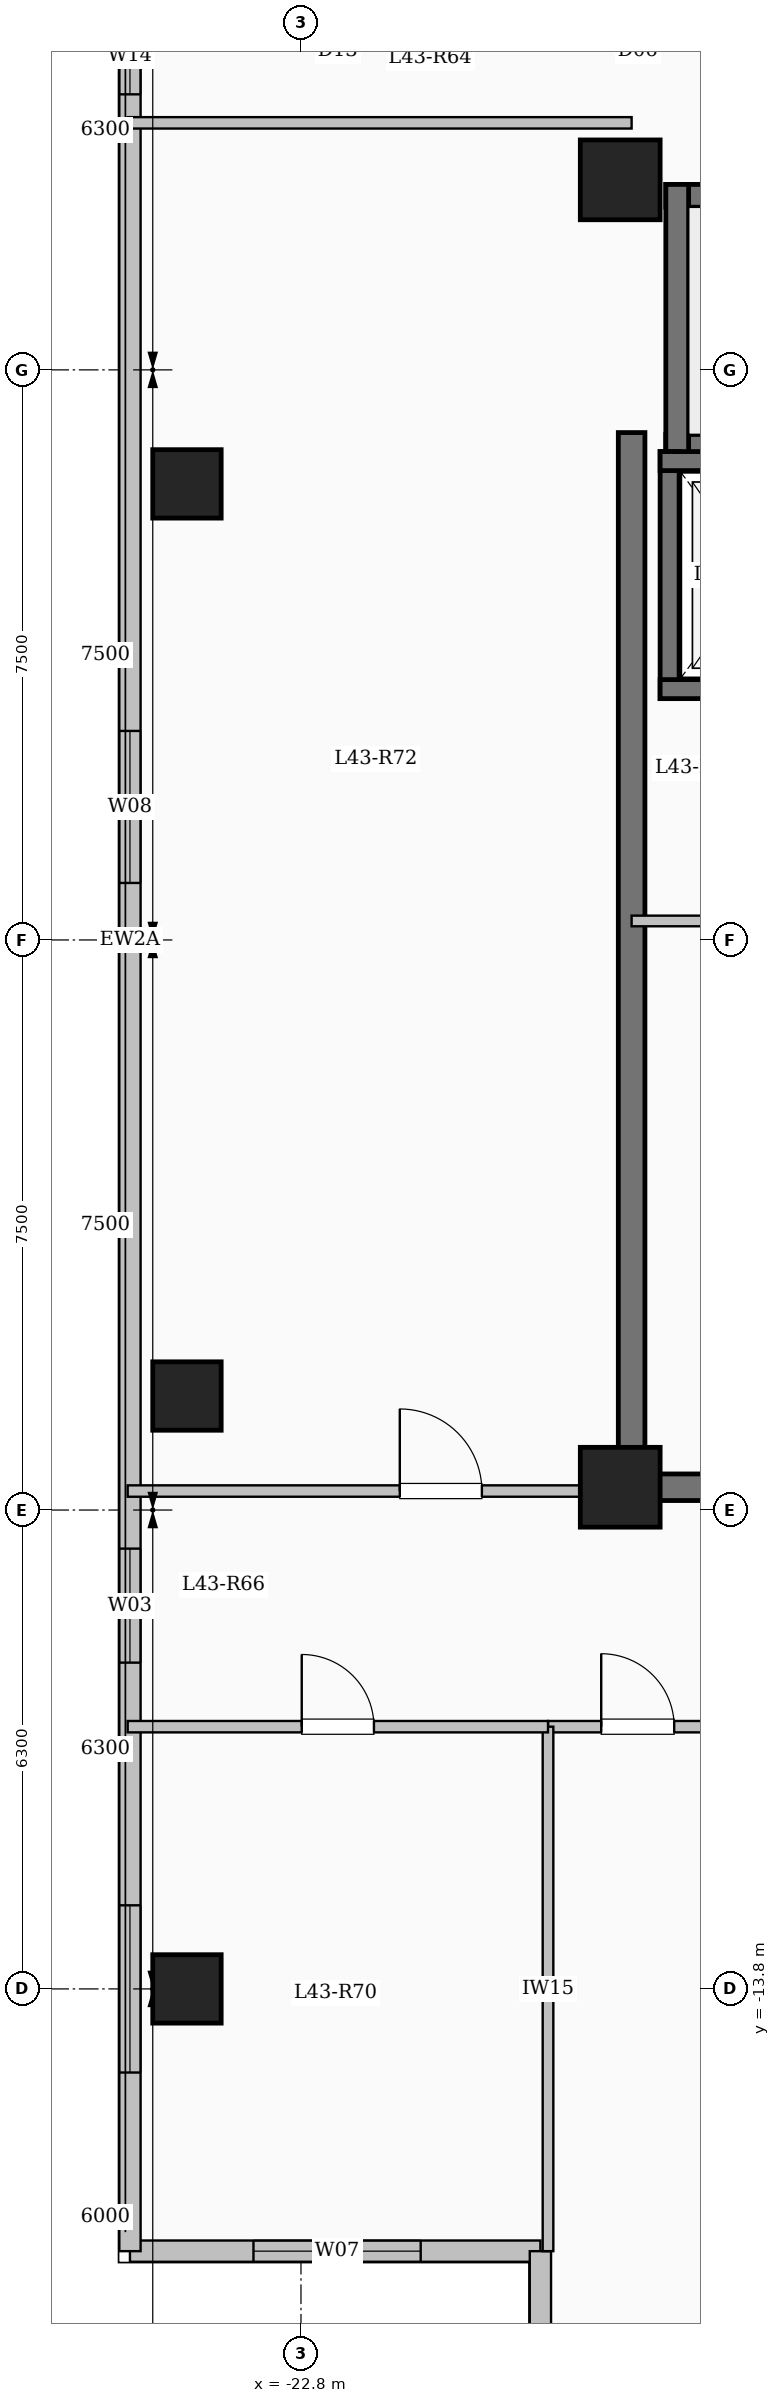
"""IFC4 building model, lengths in metres.
Left out: names, types, materials, properties, quantities, classifications, styles, units other than length and angle.
Written with IfcOpenShell. Run it as: python <this file> out.ifc"""

import sys

from ifc_helpers import new_model, si_unit, direction, frame, frame_2d, origin, origin_2d, place, context, subcontext, project, spatial, rectangle, extrude, element, fill, save


model = new_model("IFC4")
c1 = context("Model", 3, precision=1e-05, world=origin(), true_north=direction((0.0, 1.0)))
c2 = subcontext(c1, "Body", "Model", "MODEL_VIEW")
j1 = project(units=[si_unit("LENGTHUNIT", "METRE"), si_unit("PLANEANGLEUNIT", "RADIAN")], contexts=[c1])
p1 = place(None, origin())
s1 = spatial("IfcSite", under=j1, at=p1, CompositionType="ELEMENT")
p2 = place(p1, origin())
s2 = spatial("IfcBuilding", under=s1, at=p2, CompositionType="ELEMENT")
p3 = place(p2, frame((0.0, 0.0, 159.4)))
s3 = spatial("IfcBuildingStorey", under=s2, at=p3, CompositionType="ELEMENT", Elevation=159.4)
for number, where, z_axis, x_axis in (
    (1, (-18.6, -7.2, 0.0), (0.0, 0.0, 1.0), (1.0, 0.0, 0.0)),
    (2, (-18.6, 10.0, 0.0), (0.0, 0.0, 1.0), (1.0, 0.0, 0.0)),
):
    element("IfcColumn", number, at=place(p3, frame(where, z_axis=z_axis, x_axis=x_axis)), inside=s3, PredefinedType="COLUMN", context=c2, shape_type="SweptSolid", body=[
        extrude(rectangle(XDim=1.05, YDim=1.05, at=origin_2d()), origin(), (0.0, 0.0, 1.0), 3.35),
    ])
for number, where, z_axis, x_axis in (
    (3, (-24.3, -13.8, 0.0), (0.0, 0.0, 1.0), (1.0, 0.0, 0.0)),
    (4, (-24.3, -6.0, 0.0), (0.0, 0.0, 1.0), (1.0, 0.0, 0.0)),
    (5, (-24.3, 6.0, 0.0), (0.0, 0.0, 1.0), (1.0, 0.0, 0.0)),
):
    element("IfcColumn", number, at=place(p3, frame(where, z_axis=z_axis, x_axis=x_axis)), inside=s3, PredefinedType="COLUMN", context=c2, shape_type="SweptSolid", body=[
        extrude(rectangle(XDim=0.9, YDim=0.9, at=origin_2d()), origin(), (0.0, 0.0, 1.0), 3.35),
    ])
p4 = place(p3, frame((-19.65, -17.25, 0.0), z_axis=(0.0, 0.0, 1.0), x_axis=(-1.0, 0.0, 0.0)))
e6 = element("IfcWall", 6, at=p4, inside=s3, PredefinedType="SOLIDWALL", context=c2, shape_type="SweptSolid", body=[
    extrude(rectangle(XDim=5.4, YDim=0.28, at=frame_2d((2.7, 0.0))), origin(), (0.0, 0.0, 1.0), 3.1),
])
p5 = place(p4, frame((1.575, 0.0, 0.9)))
e7 = element("IfcOpeningElement", 7, at=p5, cuts=e6, PredefinedType="OPENING", context=c2, shape_type="SweptSolid", body=[
    extrude(rectangle(XDim=2.2, YDim=1.75, at=frame_2d((1.1, 0.875))), frame((0.0, 0.15, 0.0), z_axis=(0.0, -1.0, 0.0), x_axis=(1.0, 0.0, 0.0)), (0.0, 0.0, 1.0), 0.3),
])
p6 = place(p3, frame((-25.05, -17.25, 0.0), z_axis=(0.0, 0.0, 1.0), x_axis=(0.0, 1.0, 0.0)))
e8 = element("IfcWall", 8, at=p6, inside=s3, PredefinedType="SOLIDWALL", context=c2, shape_type="SweptSolid", body=[
    extrude(rectangle(XDim=34.5, YDim=0.28, at=frame_2d((17.25, 0.0))), origin(), (0.0, 0.0, 1.0), 3.1),
])
p7 = place(p6, frame((2.35, 0.0, 0.9)))
e9 = element("IfcOpeningElement", 9, at=p7, cuts=e8, PredefinedType="OPENING", context=c2, shape_type="SweptSolid", body=[
    extrude(rectangle(XDim=2.2, YDim=1.75, at=frame_2d((1.1, 0.875))), frame((0.0, 0.15, 0.0), z_axis=(0.0, -1.0, 0.0), x_axis=(1.0, 0.0, 0.0)), (0.0, 0.0, 1.0), 0.3),
])
p8 = place(p6, frame((7.742, 0.0, 0.9)))
e10 = element("IfcOpeningElement", 10, at=p8, cuts=e8, PredefinedType="OPENING", context=c2, shape_type="SweptSolid", body=[
    extrude(rectangle(XDim=1.5, YDim=1.65, at=frame_2d((0.75, 0.825))), frame((0.0, 0.15, 0.0), z_axis=(0.0, -1.0, 0.0), x_axis=(1.0, 0.0, 0.0)), (0.0, 0.0, 1.0), 0.3),
])
p9 = place(p6, frame((18.0, 0.0, 0.9)))
e11 = element("IfcOpeningElement", 11, at=p9, cuts=e8, PredefinedType="OPENING", context=c2, shape_type="SweptSolid", body=[
    extrude(rectangle(XDim=2.0, YDim=1.7, at=frame_2d((1.0, 0.85))), frame((0.0, 0.15, 0.0), z_axis=(0.0, -1.0, 0.0), x_axis=(1.0, 0.0, 0.0)), (0.0, 0.0, 1.0), 0.3),
])
p10 = place(p6, frame((28.375, 0.0, 0.95)))
e12 = element("IfcOpeningElement", 12, at=p10, cuts=e8, PredefinedType="OPENING", context=c2, shape_type="SweptSolid", body=[
    extrude(rectangle(XDim=1.0, YDim=1.5, at=frame_2d((0.5, 0.75))), frame((0.0, 0.15, 0.0), z_axis=(0.0, -1.0, 0.0), x_axis=(1.0, 0.0, 0.0)), (0.0, 0.0, 1.0), 0.3),
])
p11 = place(p6, frame((31.125, 0.0, 0.9)))
e13 = element("IfcOpeningElement", 13, at=p11, cuts=e8, PredefinedType="OPENING", context=c2, shape_type="SweptSolid", body=[
    extrude(rectangle(XDim=2.0, YDim=1.7, at=frame_2d((1.0, 0.85))), frame((0.0, 0.15, 0.0), z_axis=(0.0, -1.0, 0.0), x_axis=(1.0, 0.0, 0.0)), (0.0, 0.0, 1.0), 0.3),
])
p12 = place(p3, frame((-19.65, -21.15, 0.0), z_axis=(0.0, 0.0, 1.0), x_axis=(0.0, 1.0, 0.0)))
e14 = element("IfcWall", 14, at=p12, inside=s3, PredefinedType="SOLIDWALL", context=c2, shape_type="SweptSolid", body=[
    extrude(rectangle(XDim=3.9, YDim=0.28, at=frame_2d((1.95, 0.0))), origin(), (0.0, 0.0, 1.0), 3.1),
])
p13 = place(p12, frame((1.143, 0.0, 0.9)))
e15 = element("IfcOpeningElement", 15, at=p13, cuts=e14, PredefinedType="OPENING", context=c2, shape_type="SweptSolid", body=[
    extrude(rectangle(XDim=1.65, YDim=1.6, at=frame_2d((0.825, 0.8))), frame((0.0, 0.15, 0.0), z_axis=(0.0, -1.0, 0.0), x_axis=(1.0, 0.0, 0.0)), (0.0, 0.0, 1.0), 0.3),
])
p14 = place(p3, frame((-18.0, 9.79, 0.0), z_axis=(0.0, 0.0, 1.0), x_axis=(1.0, 0.0, 0.0)))
e16 = element("IfcWall", 16, at=p14, inside=s3, PredefinedType="SHEAR", context=c2, shape_type="SweptSolid", body=[
    extrude(rectangle(XDim=8.0, YDim=0.3, at=frame_2d((4.0, 0.0))), origin(), (0.0, 0.0, 1.0), 3.35),
])
p15 = place(p3, frame((-18.0, 6.5, 0.0), z_axis=(0.0, 0.0, 1.0), x_axis=(1.0, 0.0, 0.0)))
e17 = element("IfcWall", 17, at=p15, inside=s3, PredefinedType="SHEAR", context=c2, shape_type="SweptSolid", body=[
    extrude(rectangle(XDim=8.0, YDim=0.3, at=frame_2d((4.0, 0.0))), origin(), (0.0, 0.0, 1.0), 3.35),
])
p16 = place(p15, frame((6.45, 0.0, 0.0)))
e18 = element("IfcOpeningElement", 18, at=p16, cuts=e17, PredefinedType="OPENING", context=c2, shape_type="SweptSolid", body=[
    extrude(rectangle(XDim=1.0, YDim=2.15, at=frame_2d((0.5, 1.075))), frame((0.0, 0.16, 0.0), z_axis=(0.0, -1.0, 0.0), x_axis=(1.0, 0.0, 0.0)), (0.0, 0.0, 1.0), 0.32),
])
p17 = place(p3, frame((-17.85, 6.35, 0.0), z_axis=(0.0, 0.0, 1.0), x_axis=(0.0, 1.0, 0.0)))
e19 = element("IfcWall", 19, at=p17, inside=s3, PredefinedType="SHEAR", context=c2, shape_type="SweptSolid", body=[
    extrude(rectangle(XDim=3.59, YDim=0.3, at=frame_2d((1.795, 0.0))), origin(), (0.0, 0.0, 1.0), 3.35),
])
p18 = place(p3, frame((-17.95, 3.175, 0.0), z_axis=(0.0, 0.0, 1.0), x_axis=(0.0, 1.0, 0.0)))
e20 = element("IfcWall", 20, at=p18, inside=s3, PredefinedType="SHEAR", context=c2, shape_type="SweptSolid", body=[
    extrude(rectangle(XDim=3.25, YDim=0.25, at=frame_2d((1.625, 0.0))), origin(), (0.0, 0.0, 1.0), 3.35),
])
for number, where, z_axis, x_axis in (
    (21, (-18.075, 3.3, 0.0), (0.0, 0.0, 1.0), (1.0, 0.0, 0.0)),
    (22, (-18.075, 6.3, 0.0), (0.0, 0.0, 1.0), (1.0, 0.0, 0.0)),
):
    element("IfcWall", number, at=place(p3, frame(where, z_axis=z_axis, x_axis=x_axis)), inside=s3, PredefinedType="SHEAR", context=c2, shape_type="SweptSolid", body=[
        extrude(rectangle(XDim=2.55, YDim=0.25, at=frame_2d((1.275, 0.0))), origin(), (0.0, 0.0, 1.0), 3.35),
    ])
p19 = place(p3, frame((-18.45, -7.375, 0.0), z_axis=(0.0, 0.0, 1.0), x_axis=(0.0, 1.0, 0.0)))
e23 = element("IfcWall", 23, at=p19, inside=s3, PredefinedType="SHEAR", context=c2, shape_type="SweptSolid", body=[
    extrude(rectangle(XDim=14.05, YDim=0.35, at=frame_2d((7.025, 0.0))), origin(), (0.0, 0.0, 1.0), 3.35),
])
p20 = place(p3, frame((-18.625, -7.2, 0.0), z_axis=(0.0, 0.0, 1.0), x_axis=(1.0, 0.0, 0.0)))
e24 = element("IfcWall", 24, at=p20, inside=s3, PredefinedType="SHEAR", context=c2, shape_type="SweptSolid", body=[
    extrude(rectangle(XDim=8.55, YDim=0.35, at=frame_2d((4.275, 0.0))), origin(), (0.0, 0.0, 1.0), 3.35),
])
p21 = place(p3, frame((-18.45, 0.25, 0.0), z_axis=(0.0, 0.0, 1.0), x_axis=(1.0, 0.0, 0.0)))
e25 = element("IfcWall", 25, at=p21, inside=s3, PredefinedType="PARTITIONING", context=c2, shape_type="SweptSolid", body=[
    extrude(rectangle(XDim=3.05, YDim=0.14, at=frame_2d((1.525, 0.0))), origin(), (0.0, 0.0, 1.0), 3.1),
])
p22 = place(p21, frame((1.05, 0.0, 0.0)))
e26 = element("IfcOpeningElement", 26, at=p22, cuts=e25, PredefinedType="OPENING", context=c2, shape_type="SweptSolid", body=[
    extrude(rectangle(XDim=0.9, YDim=2.08, at=frame_2d((0.45, 1.04))), frame((0.0, 0.08, 0.0), z_axis=(0.0, -1.0, 0.0), x_axis=(1.0, 0.0, 0.0)), (0.0, 0.0, 1.0), 0.16),
])
p23 = place(p3, frame((-19.55, -10.35, 0.0), z_axis=(0.0, 0.0, 1.0), x_axis=(1.0, 0.0, 0.0)))
e27 = element("IfcWall", 27, at=p23, inside=s3, PredefinedType="PARTITIONING", context=c2, shape_type="SweptSolid", body=[
    extrude(rectangle(XDim=11.0, YDim=0.15, at=frame_2d((5.5, 0.0))), origin(), (0.0, 0.0, 1.0), 3.1),
])
p24 = place(p23, frame((0.7, 0.0, 0.0)))
e28 = element("IfcOpeningElement", 28, at=p24, cuts=e27, PredefinedType="OPENING", context=c2, shape_type="SweptSolid", body=[
    extrude(rectangle(XDim=0.96, YDim=2.15, at=frame_2d((0.48, 1.075))), frame((0.0, 0.085, 0.0), z_axis=(0.0, -1.0, 0.0), x_axis=(1.0, 0.0, 0.0)), (0.0, 0.0, 1.0), 0.17),
])
p25 = place(p3, frame((-25.08, -7.25, 0.0), z_axis=(0.0, 0.0, 1.0), x_axis=(1.0, 0.0, 0.0)))
e29 = element("IfcWall", 29, at=p25, inside=s3, PredefinedType="PARTITIONING", context=c2, shape_type="SweptSolid", body=[
    extrude(rectangle(XDim=6.63, YDim=0.15, at=frame_2d((3.315, 0.0))), origin(), (0.0, 0.0, 1.0), 3.1),
])
p26 = place(p25, frame((3.58, 0.0, 0.0)))
e30 = element("IfcOpeningElement", 30, at=p26, cuts=e29, PredefinedType="OPENING", context=c2, shape_type="SweptSolid", body=[
    extrude(rectangle(XDim=1.08, YDim=2.15, at=frame_2d((0.54, 1.075))), frame((0.0, 0.085, 0.0), z_axis=(0.0, -1.0, 0.0), x_axis=(1.0, 0.0, 0.0)), (0.0, 0.0, 1.0), 0.17),
])
p27 = place(p3, frame((-25.08, 10.75, 0.0), z_axis=(0.0, 0.0, 1.0), x_axis=(1.0, 0.0, 0.0)))
e31 = element("IfcWall", 31, at=p27, inside=s3, PredefinedType="PARTITIONING", context=c2, shape_type="SweptSolid", body=[
    extrude(rectangle(XDim=6.63, YDim=0.15, at=frame_2d((3.315, 0.0))), origin(), (0.0, 0.0, 1.0), 3.1),
])
p28 = place(p3, frame((-19.55, -17.25, 0.0), z_axis=(0.0, 0.0, 1.0), x_axis=(0.0, 1.0, 0.0)))
e32 = element("IfcWall", 32, at=p28, inside=s3, PredefinedType="PARTITIONING", context=c2, shape_type="SweptSolid", body=[
    extrude(rectangle(XDim=6.9, YDim=0.14, at=frame_2d((3.45, 0.0))), origin(), (0.0, 0.0, 1.0), 3.1),
])
p29 = place(p3, frame((-25.08, -10.35, 0.0), z_axis=(0.0, 0.0, 1.0), x_axis=(1.0, 0.0, 0.0)))
e33 = element("IfcWall", 33, at=p29, inside=s3, PredefinedType="PARTITIONING", context=c2, shape_type="SweptSolid", body=[
    extrude(rectangle(XDim=5.53, YDim=0.15, at=frame_2d((2.765, 0.0))), origin(), (0.0, 0.0, 1.0), 3.1),
])
p30 = place(p29, frame((2.29, 0.0, 0.0)))
e34 = element("IfcOpeningElement", 34, at=p30, cuts=e33, PredefinedType="OPENING", context=c2, shape_type="SweptSolid", body=[
    extrude(rectangle(XDim=0.95, YDim=2.15, at=frame_2d((0.475, 1.075))), frame((0.0, 0.085, 0.0), z_axis=(0.0, -1.0, 0.0), x_axis=(1.0, 0.0, 0.0)), (0.0, 0.0, 1.0), 0.17),
])
p31 = place(p5, origin())
e35 = element("IfcWindow", 35, at=p31, inside=s3, PartitioningType="SINGLE_PANEL", PredefinedType="WINDOW", context=c2, shape_type="SweptSolid", body=[
    extrude(rectangle(XDim=2.2, YDim=1.75, at=frame_2d((1.1, 0.875))), frame((0.0, 0.03, 0.0), z_axis=(0.0, -1.0, 0.0), x_axis=(1.0, 0.0, 0.0)), (0.0, 0.0, 1.0), 0.06),
])
fill(e7, e35)
p32 = place(p7, origin())
e36 = element("IfcWindow", 36, at=p32, inside=s3, PartitioningType="SINGLE_PANEL", PredefinedType="WINDOW", context=c2, shape_type="SweptSolid", body=[
    extrude(rectangle(XDim=2.2, YDim=1.75, at=frame_2d((1.1, 0.875))), frame((0.0, 0.03, 0.0), z_axis=(0.0, -1.0, 0.0), x_axis=(1.0, 0.0, 0.0)), (0.0, 0.0, 1.0), 0.06),
])
fill(e9, e36)
p33 = place(p8, origin())
e37 = element("IfcWindow", 37, at=p33, inside=s3, PartitioningType="SINGLE_PANEL", PredefinedType="WINDOW", context=c2, shape_type="SweptSolid", body=[
    extrude(rectangle(XDim=1.5, YDim=1.65, at=frame_2d((0.75, 0.825))), frame((0.0, 0.03, 0.0), z_axis=(0.0, -1.0, 0.0), x_axis=(1.0, 0.0, 0.0)), (0.0, 0.0, 1.0), 0.06),
])
fill(e10, e37)
p34 = place(p9, origin())
e38 = element("IfcWindow", 38, at=p34, inside=s3, PartitioningType="SINGLE_PANEL", PredefinedType="WINDOW", context=c2, shape_type="SweptSolid", body=[
    extrude(rectangle(XDim=2.0, YDim=1.7, at=frame_2d((1.0, 0.85))), frame((0.0, 0.03, 0.0), z_axis=(0.0, -1.0, 0.0), x_axis=(1.0, 0.0, 0.0)), (0.0, 0.0, 1.0), 0.06),
])
fill(e11, e38)
p35 = place(p10, origin())
e39 = element("IfcWindow", 39, at=p35, inside=s3, PartitioningType="SINGLE_PANEL", PredefinedType="WINDOW", context=c2, shape_type="SweptSolid", body=[
    extrude(rectangle(XDim=1.0, YDim=1.5, at=frame_2d((0.5, 0.75))), frame((0.0, 0.03, 0.0), z_axis=(0.0, -1.0, 0.0), x_axis=(1.0, 0.0, 0.0)), (0.0, 0.0, 1.0), 0.06),
])
fill(e12, e39)
p36 = place(p24, origin())
e40 = element("IfcDoor", 40, at=p36, inside=s3, OperationType="SINGLE_SWING_LEFT", PredefinedType="DOOR", context=c2, shape_type="SweptSolid", body=[
    extrude(rectangle(XDim=0.96, YDim=2.15, at=frame_2d((0.48, 1.075))), frame((0.0, 0.025, 0.0), z_axis=(0.0, -1.0, 0.0), x_axis=(1.0, 0.0, 0.0)), (0.0, 0.0, 1.0), 0.05),
])
fill(e28, e40)
p37 = place(p30, origin())
e41 = element("IfcDoor", 41, at=p37, inside=s3, OperationType="SINGLE_SWING_LEFT", PredefinedType="DOOR", context=c2, shape_type="SweptSolid", body=[
    extrude(rectangle(XDim=0.95, YDim=2.15, at=frame_2d((0.475, 1.075))), frame((0.0, 0.025, 0.0), z_axis=(0.0, -1.0, 0.0), x_axis=(1.0, 0.0, 0.0)), (0.0, 0.0, 1.0), 0.05),
])
fill(e34, e41)
p38 = place(p26, origin())
e42 = element("IfcDoor", 42, at=p38, inside=s3, OperationType="SINGLE_SWING_LEFT", PredefinedType="DOOR", context=c2, shape_type="SweptSolid", body=[
    extrude(rectangle(XDim=1.08, YDim=2.15, at=frame_2d((0.54, 1.075))), frame((0.0, 0.025, 0.0), z_axis=(0.0, -1.0, 0.0), x_axis=(1.0, 0.0, 0.0)), (0.0, 0.0, 1.0), 0.05),
])
fill(e30, e42)
save(model, sys.argv[1])
